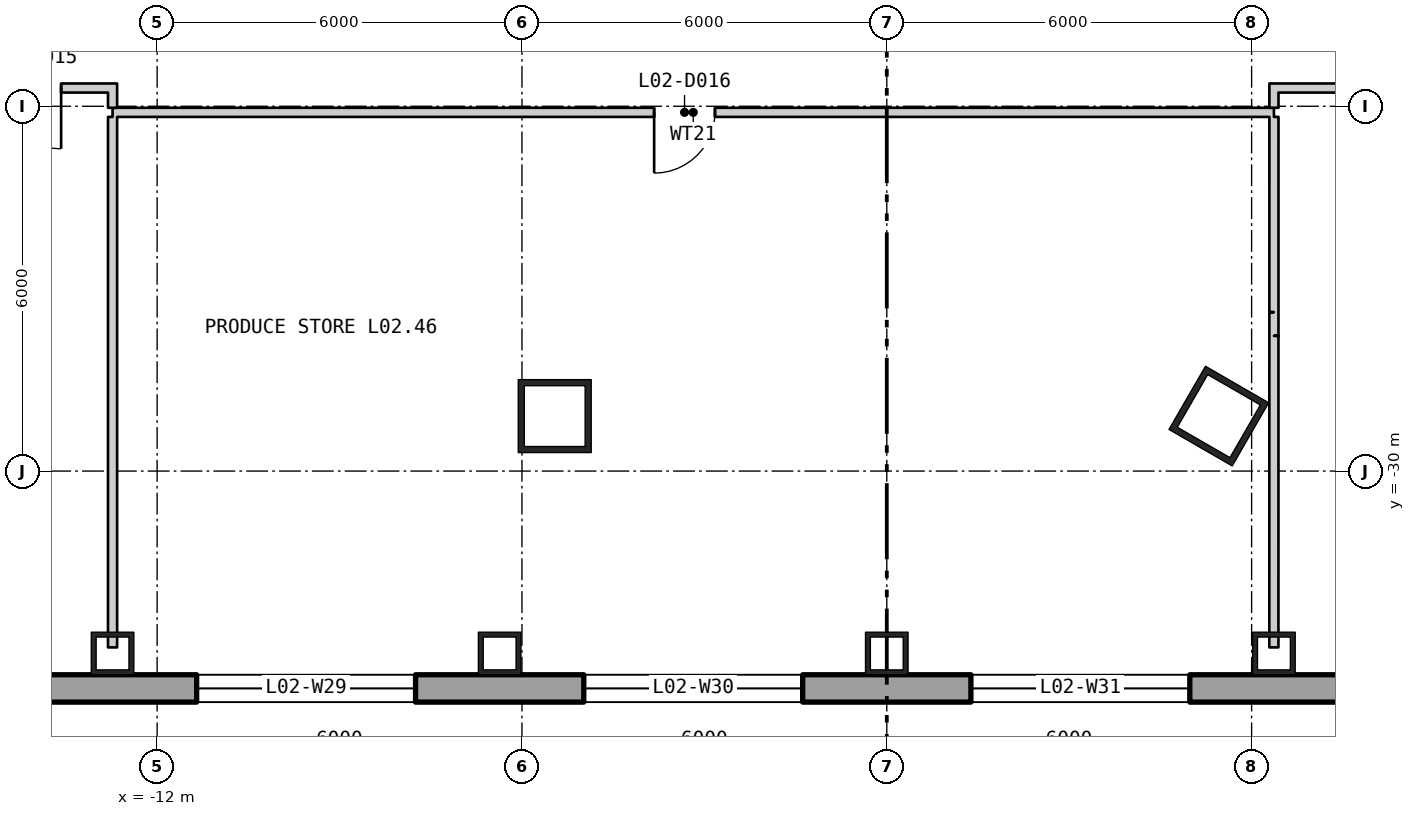
"""IFC4 building model, lengths in metres.
Left out: names, types, materials, properties, quantities, classifications, styles, units other than length and angle.
Written with IfcOpenShell. Run it as: python <this file> out.ifc"""

import sys

from ifc_helpers import new_model, si_unit, direction, frame, frame_2d, origin, origin_2d, place, context, subcontext, project, spatial, polyline, rectangle, hollow_rectangle, outline, extrude, element, fill, save


model = new_model("IFC4")
c1 = context("Model", 3, precision=1e-05, world=origin(), true_north=direction((0.0, 1.0)))
c2 = subcontext(c1, "Body", "Model", "MODEL_VIEW")
j1 = project(units=[si_unit("LENGTHUNIT", "METRE"), si_unit("PLANEANGLEUNIT", "RADIAN")], contexts=[c1])
p1 = place(None, origin())
s1 = spatial("IfcSite", under=j1, at=p1, CompositionType="ELEMENT")
p2 = place(p1, origin())
s2 = spatial("IfcBuilding", under=s1, at=p2, CompositionType="ELEMENT")
p3 = place(p2, frame((0.0, 0.0, 13.5)))
s3 = spatial("IfcBuildingStorey", under=s2, at=p3, CompositionType="ELEMENT", Elevation=13.5)
for number, where, z_axis, x_axis in (
    (1, (-5.461, -29.096, 0.0), (0.0, 0.0, 1.0), (1.0, 0.0, 0.0)),
    (2, (5.461, -29.096, 0.0), (0.0, 0.0, 1.0), (0.5, 0.866, 0.0)),
):
    element("IfcColumn", number, at=place(p3, frame(where, z_axis=z_axis, x_axis=x_axis)), inside=s3, PredefinedType="COLUMN", context=c2, shape_type="SweptSolid", body=[
        extrude(hollow_rectangle(XDim=1.2, YDim=1.2, WallThickness=0.1, at=origin_2d()), origin(), (0.0, 0.0, 1.0), 5.1),
    ])
for number, where, z_axis, x_axis in (
    (3, (-12.733, -33.0, 0.0), (0.0, 0.0, 1.0), (1.0, 0.0, 0.0)),
    (4, (-6.367, -33.0, 0.0), (0.0, 0.0, 1.0), (1.0, 0.0, 0.0)),
    (5, (0.0, -33.0, 0.0), (0.0, 0.0, 1.0), (1.0, 0.0, 0.0)),
    (6, (6.367, -33.0, 0.0), (0.0, 0.0, 1.0), (1.0, 0.0, 0.0)),
):
    element("IfcColumn", number, at=place(p3, frame(where, z_axis=z_axis, x_axis=x_axis)), inside=s3, PredefinedType="COLUMN", context=c2, shape_type="SweptSolid", body=[
        extrude(hollow_rectangle(XDim=0.7, YDim=0.7, WallThickness=0.08, at=origin_2d()), origin(), (0.0, 0.0, 1.0), 5.1),
    ])
p4 = place(p3, frame((-38.775, -33.575, -0.4), z_axis=(0.0, 0.0, 1.0), x_axis=(1.0, 0.0, 0.0)))
e7 = element("IfcWall", 7, at=p4, inside=s3, PredefinedType="SOLIDWALL", context=c2, shape_type="SweptSolid", body=[
    extrude(outline(polyline([(-0.225, -0.225), (77.775, -0.225), (77.325, 0.225), (0.225, 0.225), (-0.225, -0.225)])), origin(), (0.0, 0.0, 1.0), 5.1),
])
p5 = place(p4, frame((1.958, 0.0, 1.3)))
e8 = element("IfcOpeningElement", 8, at=p5, cuts=e7, PredefinedType="OPENING", context=c2, shape_type="SweptSolid", body=[
    extrude(rectangle(XDim=3.6, YDim=3.2, at=frame_2d((1.8, 1.6))), frame((0.0, 0.235, 0.0), z_axis=(0.0, -1.0, 0.0), x_axis=(1.0, 0.0, 0.0)), (0.0, 0.0, 1.0), 0.47),
])
p6 = place(p4, frame((8.325, 0.0, 1.3)))
e9 = element("IfcOpeningElement", 9, at=p6, cuts=e7, PredefinedType="OPENING", context=c2, shape_type="SweptSolid", body=[
    extrude(rectangle(XDim=3.6, YDim=3.2, at=frame_2d((1.8, 1.6))), frame((0.0, 0.235, 0.0), z_axis=(0.0, -1.0, 0.0), x_axis=(1.0, 0.0, 0.0)), (0.0, 0.0, 1.0), 0.47),
])
p7 = place(p4, frame((14.692, 0.0, 1.3)))
e10 = element("IfcOpeningElement", 10, at=p7, cuts=e7, PredefinedType="OPENING", context=c2, shape_type="SweptSolid", body=[
    extrude(rectangle(XDim=3.6, YDim=3.2, at=frame_2d((1.8, 1.6))), frame((0.0, 0.235, 0.0), z_axis=(0.0, -1.0, 0.0), x_axis=(1.0, 0.0, 0.0)), (0.0, 0.0, 1.0), 0.47),
])
p8 = place(p4, frame((21.325, 0.0, 1.3)))
e11 = element("IfcOpeningElement", 11, at=p8, cuts=e7, PredefinedType="OPENING", context=c2, shape_type="SweptSolid", body=[
    extrude(rectangle(XDim=3.6, YDim=3.2, at=frame_2d((1.8, 1.6))), frame((0.0, 0.235, 0.0), z_axis=(0.0, -1.0, 0.0), x_axis=(1.0, 0.0, 0.0)), (0.0, 0.0, 1.0), 0.47),
])
p9 = place(p4, frame((27.425, 0.0, 1.3)))
e12 = element("IfcOpeningElement", 12, at=p9, cuts=e7, PredefinedType="OPENING", context=c2, shape_type="SweptSolid", body=[
    extrude(rectangle(XDim=3.6, YDim=3.2, at=frame_2d((1.8, 1.6))), frame((0.0, 0.235, 0.0), z_axis=(0.0, -1.0, 0.0), x_axis=(1.0, 0.0, 0.0)), (0.0, 0.0, 1.0), 0.47),
])
p10 = place(p4, frame((33.792, 0.0, 1.3)))
e13 = element("IfcOpeningElement", 13, at=p10, cuts=e7, PredefinedType="OPENING", context=c2, shape_type="SweptSolid", body=[
    extrude(rectangle(XDim=3.6, YDim=3.2, at=frame_2d((1.8, 1.6))), frame((0.0, 0.235, 0.0), z_axis=(0.0, -1.0, 0.0), x_axis=(1.0, 0.0, 0.0)), (0.0, 0.0, 1.0), 0.47),
])
p11 = place(p4, frame((40.158, 0.0, 1.3)))
e14 = element("IfcOpeningElement", 14, at=p11, cuts=e7, PredefinedType="OPENING", context=c2, shape_type="SweptSolid", body=[
    extrude(rectangle(XDim=3.6, YDim=3.2, at=frame_2d((1.8, 1.6))), frame((0.0, 0.235, 0.0), z_axis=(0.0, -1.0, 0.0), x_axis=(1.0, 0.0, 0.0)), (0.0, 0.0, 1.0), 0.47),
])
p12 = place(p4, frame((46.525, 0.0, 1.3)))
e15 = element("IfcOpeningElement", 15, at=p12, cuts=e7, PredefinedType="OPENING", context=c2, shape_type="SweptSolid", body=[
    extrude(rectangle(XDim=3.6, YDim=3.2, at=frame_2d((1.8, 1.6))), frame((0.0, 0.235, 0.0), z_axis=(0.0, -1.0, 0.0), x_axis=(1.0, 0.0, 0.0)), (0.0, 0.0, 1.0), 0.47),
])
p13 = place(p4, frame((52.625, 0.0, 1.3)))
e16 = element("IfcOpeningElement", 16, at=p13, cuts=e7, PredefinedType="OPENING", context=c2, shape_type="SweptSolid", body=[
    extrude(rectangle(XDim=3.6, YDim=3.2, at=frame_2d((1.8, 1.6))), frame((0.0, 0.235, 0.0), z_axis=(0.0, -1.0, 0.0), x_axis=(1.0, 0.0, 0.0)), (0.0, 0.0, 1.0), 0.47),
])
p14 = place(p4, frame((59.258, 0.0, 1.3)))
e17 = element("IfcOpeningElement", 17, at=p14, cuts=e7, PredefinedType="OPENING", context=c2, shape_type="SweptSolid", body=[
    extrude(rectangle(XDim=3.6, YDim=3.2, at=frame_2d((1.8, 1.6))), frame((0.0, 0.235, 0.0), z_axis=(0.0, -1.0, 0.0), x_axis=(1.0, 0.0, 0.0)), (0.0, 0.0, 1.0), 0.47),
])
p15 = place(p4, frame((65.625, 0.0, 1.3)))
e18 = element("IfcOpeningElement", 18, at=p15, cuts=e7, PredefinedType="OPENING", context=c2, shape_type="SweptSolid", body=[
    extrude(rectangle(XDim=3.6, YDim=3.2, at=frame_2d((1.8, 1.6))), frame((0.0, 0.235, 0.0), z_axis=(0.0, -1.0, 0.0), x_axis=(1.0, 0.0, 0.0)), (0.0, 0.0, 1.0), 0.47),
])
p16 = place(p4, frame((71.992, 0.0, 1.3)))
e19 = element("IfcOpeningElement", 19, at=p16, cuts=e7, PredefinedType="OPENING", context=c2, shape_type="SweptSolid", body=[
    extrude(rectangle(XDim=3.6, YDim=3.2, at=frame_2d((1.8, 1.6))), frame((0.0, 0.235, 0.0), z_axis=(0.0, -1.0, 0.0), x_axis=(1.0, 0.0, 0.0)), (0.0, 0.0, 1.0), 0.47),
])
p17 = place(p3, frame((-15.35, -23.7, 0.0), z_axis=(0.0, 0.0, 1.0), x_axis=(1.0, 0.0, 0.0)))
e20 = element("IfcWall", 20, at=p17, inside=s3, PredefinedType="PARTITIONING", context=c2, shape_type="SweptSolid", body=[
    extrude(rectangle(XDim=2.542, YDim=0.15, at=frame_2d((1.271, 0.0))), origin(), (0.0, 0.0, 1.0), 4.88),
])
p18 = place(p17, frame((0.771, 0.0, 0.0)))
e21 = element("IfcOpeningElement", 21, at=p18, cuts=e20, PredefinedType="OPENING", context=c2, shape_type="SweptSolid", body=[
    extrude(rectangle(XDim=1.0, YDim=2.1, at=frame_2d((0.5, 1.05))), frame((0.0, 0.085, 0.0), z_axis=(0.0, -1.0, 0.0), x_axis=(1.0, 0.0, 0.0)), (0.0, 0.0, 1.0), 0.17),
])
p19 = place(p3, frame((-12.733, -32.9, 0.0), z_axis=(0.0, 0.0, 1.0), x_axis=(0.0, 1.0, 0.0)))
e22 = element("IfcWall", 22, at=p19, inside=s3, PredefinedType="PARTITIONING", context=c2, shape_type="SweptSolid", body=[
    extrude(rectangle(XDim=8.725, YDim=0.15, at=frame_2d((4.362, 0.0))), origin(), (0.0, 0.0, 1.0), 4.19),
])
p20 = place(p3, frame((-12.733, -24.1, 0.0), z_axis=(0.0, 0.0, 1.0), x_axis=(1.0, 0.0, 0.0)))
e23 = element("IfcWall", 23, at=p20, inside=s3, PredefinedType="PARTITIONING", context=c2, shape_type="SweptSolid", body=[
    extrude(rectangle(XDim=19.1, YDim=0.15, at=frame_2d((9.55, 0.0))), origin(), (0.0, 0.0, 1.0), 4.88),
])
p21 = place(p20, frame((8.907, 0.0, 0.0)))
e24 = element("IfcOpeningElement", 24, at=p21, cuts=e23, PredefinedType="OPENING", context=c2, shape_type="SweptSolid", body=[
    extrude(rectangle(XDim=1.0, YDim=2.1, at=frame_2d((0.5, 1.05))), frame((0.0, 0.085, 0.0), z_axis=(0.0, -1.0, 0.0), x_axis=(1.0, 0.0, 0.0)), (0.0, 0.0, 1.0), 0.17),
])
p22 = place(p3, frame((-12.733, -24.025, 0.0), z_axis=(0.0, 0.0, 1.0), x_axis=(0.0, 1.0, 0.0)))
e25 = element("IfcWall", 25, at=p22, inside=s3, PredefinedType="PARTITIONING", context=c2, shape_type="SweptSolid", body=[
    extrude(rectangle(XDim=0.4, YDim=0.15, at=frame_2d((0.2, 0.0))), origin(), (0.0, 0.0, 1.0), 4.88),
])
p23 = place(p3, frame((6.366, -32.9, 0.0), z_axis=(0.0, 0.0, 1.0), x_axis=(0.000117096018, 0.999999993144, 0.0)))
e26 = element("IfcWall", 26, at=p23, inside=s3, PredefinedType="PARTITIONING", context=c2, shape_type="SweptSolid", body=[
    extrude(rectangle(XDim=5.124, YDim=0.15, at=frame_2d((2.562, 0.0))), origin(), (0.0, 0.0, 1.0), 4.28),
])
p24 = place(p3, frame((6.367, -27.776, 0.0), z_axis=(0.0, 0.0, 1.0), x_axis=(0.0, 1.0, 0.0)))
e27 = element("IfcWall", 27, at=p24, inside=s3, PredefinedType="PARTITIONING", context=c2, shape_type="SweptSolid", body=[
    extrude(rectangle(XDim=0.39, YDim=0.15, at=frame_2d((0.195, 0.0))), origin(), (0.0, 0.0, 1.0), 4.88),
])
p25 = place(p3, frame((6.367, -27.386, 0.0), z_axis=(0.0, 0.0, 1.0), x_axis=(0.000124571784, 0.999999992241, 0.0)))
e28 = element("IfcWall", 28, at=p25, inside=s3, PredefinedType="PARTITIONING", context=c2, shape_type="SweptSolid", body=[
    extrude(rectangle(XDim=3.211, YDim=0.15, at=frame_2d((1.605, 0.0))), origin(), (0.0, 0.0, 1.0), 4.28),
])
p26 = place(p3, frame((6.367, -24.025, 0.0), z_axis=(0.0, 0.0, 1.0), x_axis=(0.0, 1.0, 0.0)))
e29 = element("IfcWall", 29, at=p26, inside=s3, PredefinedType="PARTITIONING", context=c2, shape_type="SweptSolid", body=[
    extrude(rectangle(XDim=0.4, YDim=0.15, at=frame_2d((0.2, 0.0))), origin(), (0.0, 0.0, 1.0), 4.88),
])
p27 = place(p3, frame((6.442, -23.7, 0.0), z_axis=(0.0, 0.0, 1.0), x_axis=(1.0, 0.0, 0.0)))
e30 = element("IfcWall", 30, at=p27, inside=s3, PredefinedType="PARTITIONING", context=c2, shape_type="SweptSolid", body=[
    extrude(rectangle(XDim=8.908, YDim=0.15, at=frame_2d((4.454, 0.0))), origin(), (0.0, 0.0, 1.0), 4.88),
])
p28 = place(p27, frame((1.814, 0.0, 0.0)))
e31 = element("IfcOpeningElement", 31, at=p28, cuts=e30, PredefinedType="OPENING", context=c2, shape_type="SweptSolid", body=[
    extrude(rectangle(XDim=1.0, YDim=2.1, at=frame_2d((0.5, 1.05))), frame((0.0, 0.085, 0.0), z_axis=(0.0, -1.0, 0.0), x_axis=(1.0, 0.0, 0.0)), (0.0, 0.0, 1.0), 0.17),
])
p29 = place(p27, frame((7.099, 0.0, 0.0)))
e32 = element("IfcOpeningElement", 32, at=p29, cuts=e30, PredefinedType="OPENING", context=c2, shape_type="SweptSolid", body=[
    extrude(rectangle(XDim=1.0, YDim=2.1, at=frame_2d((0.5, 1.05))), frame((0.0, 0.085, 0.0), z_axis=(0.0, -1.0, 0.0), x_axis=(1.0, 0.0, 0.0)), (0.0, 0.0, 1.0), 0.17),
])
p30 = place(p9, origin())
e33 = element("IfcWindow", 33, at=p30, inside=s3, PartitioningType="SINGLE_PANEL", PredefinedType="WINDOW", context=c2, shape_type="SweptSolid", body=[
    extrude(rectangle(XDim=3.6, YDim=3.2, at=frame_2d((1.8, 1.6))), frame((0.0, 0.105, 0.0), z_axis=(0.0, -1.0, 0.0), x_axis=(1.0, 0.0, 0.0)), (0.0, 0.0, 1.0), 0.06),
])
fill(e12, e33)
p31 = place(p10, origin())
e34 = element("IfcWindow", 34, at=p31, inside=s3, PartitioningType="SINGLE_PANEL", PredefinedType="WINDOW", context=c2, shape_type="SweptSolid", body=[
    extrude(rectangle(XDim=3.6, YDim=3.2, at=frame_2d((1.8, 1.6))), frame((0.0, 0.105, 0.0), z_axis=(0.0, -1.0, 0.0), x_axis=(1.0, 0.0, 0.0)), (0.0, 0.0, 1.0), 0.06),
])
fill(e13, e34)
p32 = place(p11, origin())
e35 = element("IfcWindow", 35, at=p32, inside=s3, PartitioningType="SINGLE_PANEL", PredefinedType="WINDOW", context=c2, shape_type="SweptSolid", body=[
    extrude(rectangle(XDim=3.6, YDim=3.2, at=frame_2d((1.8, 1.6))), frame((0.0, 0.105, 0.0), z_axis=(0.0, -1.0, 0.0), x_axis=(1.0, 0.0, 0.0)), (0.0, 0.0, 1.0), 0.06),
])
fill(e14, e35)
p33 = place(p18, origin())
e36 = element("IfcDoor", 36, at=p33, inside=s3, OperationType="SINGLE_SWING_RIGHT", PredefinedType="DOOR", context=c2, shape_type="SweptSolid", body=[
    extrude(rectangle(XDim=1.0, YDim=2.1, at=frame_2d((0.5, 1.05))), frame((0.0, 0.025, 0.0), z_axis=(0.0, -1.0, 0.0), x_axis=(1.0, 0.0, 0.0)), (0.0, 0.0, 1.0), 0.05),
])
fill(e21, e36)
p34 = place(p21, origin())
e37 = element("IfcDoor", 37, at=p34, inside=s3, OperationType="SINGLE_SWING_LEFT", PredefinedType="DOOR", context=c2, shape_type="SweptSolid", body=[
    extrude(rectangle(XDim=1.0, YDim=2.1, at=frame_2d((0.5, 1.05))), frame((0.0, 0.025, 0.0), z_axis=(0.0, -1.0, 0.0), x_axis=(1.0, 0.0, 0.0)), (0.0, 0.0, 1.0), 0.05),
])
fill(e24, e37)
save(model, sys.argv[1])
